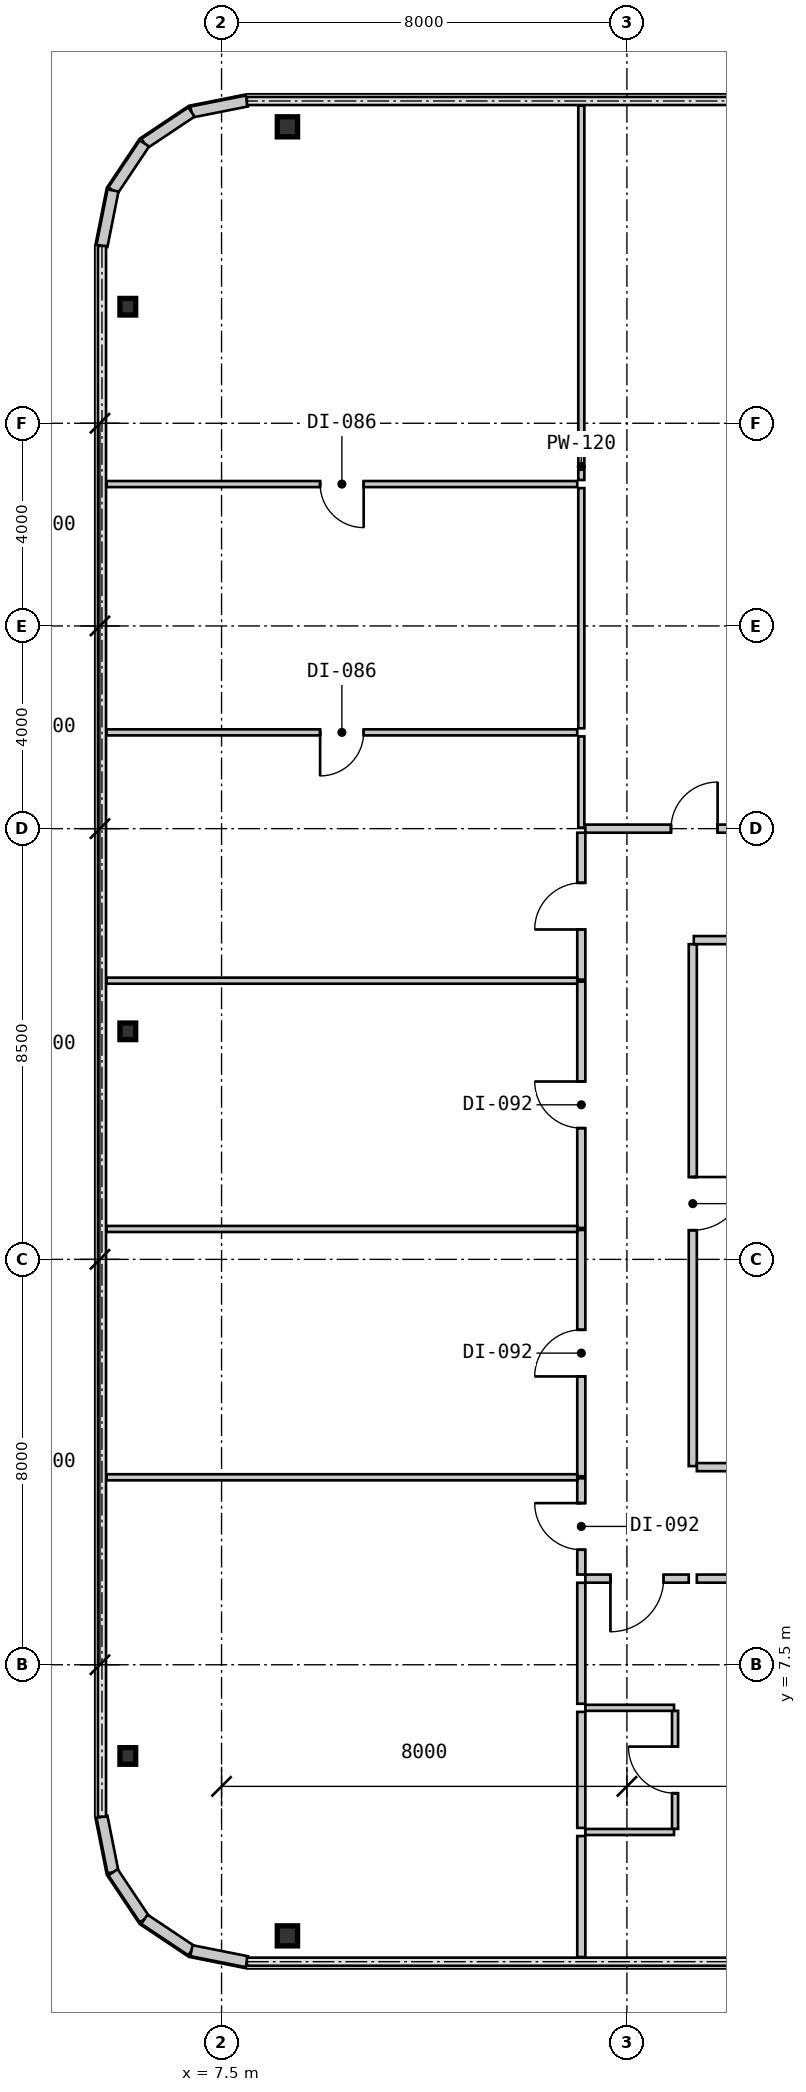
"""IFC4 building model, lengths in metres.
Left out: names, types, materials, properties, quantities, classifications, styles, units other than length and angle.
Written with IfcOpenShell. Run it as: python <this file> out.ifc"""

import sys

from ifc_helpers import new_model, si_unit, direction, frame, frame_2d, origin, origin_2d, place, context, subcontext, project, spatial, rectangle, i_section, extrude, source, transform, mapped, element, fill, save


model = new_model("IFC4")
c1 = context("Model", 3, precision=1e-05, world=origin(), true_north=direction((0.0, 1.0)))
c2 = subcontext(c1, "Body", "Model", "MODEL_VIEW")
j1 = project(units=[si_unit("LENGTHUNIT", "METRE"), si_unit("PLANEANGLEUNIT", "RADIAN")], contexts=[c1])
p1 = place(None, origin())
s1 = spatial("IfcSite", under=j1, at=p1, CompositionType="ELEMENT")
p2 = place(p1, origin())
s2 = spatial("IfcBuilding", under=s1, at=p2, CompositionType="ELEMENT")
p3 = place(p2, frame((0.0, 0.0, 32.55)))
s3 = spatial("IfcBuildingStorey", under=s2, at=p3, CompositionType="ELEMENT", Elevation=32.55)
m1 = source(origin(), c2, "Body", "SweptSolid", [
    extrude(i_section(OverallWidth=0.4, OverallDepth=0.396, WebThickness=0.022, FlangeThickness=0.034, at=origin_2d()), origin(), (0.0, 0.0, 1.0), 3.15),
])
for number, where, z_axis, x_axis in (
    (1, (8.8, 2.15, 0.0), (0.0, 0.0, 1.0), (1.0, 0.0, 0.0)),
    (2, (8.8, 37.85, 0.0), (0.0, 0.0, 1.0), (1.0, 0.0, 0.0)),
):
    element("IfcColumn", number, at=place(p3, frame(where, z_axis=z_axis, x_axis=x_axis)), inside=s3, PredefinedType="COLUMN", context=c2, shape_type="MappedRepresentation", body=[
        mapped(m1, transform((0.0, 0.0, 0.0), scale=1.0)),
    ])
m2 = source(origin(), c2, "Body", "SweptSolid", [
    extrude(i_section(OverallWidth=0.311, OverallDepth=0.327, WebThickness=0.016, FlangeThickness=0.025, at=origin_2d()), origin(), (0.0, 0.0, 1.0), 3.15),
])
for number, where, z_axis, x_axis in (
    (3, (5.65, 5.7, 0.0), (0.0, 0.0, 1.0), (1.0, 0.0, 0.0)),
    (4, (5.65, 20.0, 0.0), (0.0, 0.0, 1.0), (1.0, 0.0, 0.0)),
    (5, (5.65, 34.3, 0.0), (0.0, 0.0, 1.0), (1.0, 0.0, 0.0)),
):
    element("IfcColumn", number, at=place(p3, frame(where, z_axis=z_axis, x_axis=x_axis)), inside=s3, PredefinedType="COLUMN", context=c2, shape_type="MappedRepresentation", body=[
        mapped(m2, transform((0.0, 0.0, 0.0), scale=1.0)),
    ])
m3 = source(origin(), c2, "Body", "SweptSolid", [
    extrude(rectangle(XDim=1.116, YDim=0.22, at=frame_2d((0.558, 0.0))), origin(), (0.0, 0.0, 1.0), 2.93),
])
for number, where, z_axis, x_axis in (
    (6, (8.0, 38.36, 0.0), (0.0, 0.0, 1.0), (-0.981, -0.195, 0.0)),
    (7, (6.906, 38.142, 0.0), (0.0, 0.0, 1.0), (-0.831, -0.556, 0.0)),
    (8, (5.978, 37.522, 0.0), (0.0, 0.0, 1.0), (-0.556, -0.831, 0.0)),
    (9, (5.358, 36.594, 0.0), (0.0, 0.0, 1.0), (-0.195, -0.981, 0.0)),
    (10, (5.14, 4.5, 0.0), (0.0, 0.0, 1.0), (0.195, -0.981, 0.0)),
    (11, (5.358, 3.406, 0.0), (0.0, 0.0, 1.0), (0.556, -0.831, 0.0)),
    (12, (5.978, 2.478, 0.0), (0.0, 0.0, 1.0), (0.831, -0.556, 0.0)),
    (13, (6.906, 1.858, 0.0), (0.0, 0.0, 1.0), (0.981, -0.195, 0.0)),
):
    element("IfcWall", number, at=place(p3, frame(where, z_axis=z_axis, x_axis=x_axis)), inside=s3, PredefinedType="SOLIDWALL", context=c2, shape_type="MappedRepresentation", body=[
        mapped(m3, transform((0.0, 0.0, 0.0), scale=1.0)),
    ])
m4 = source(origin(), c2, "Body", "SweptSolid", [
    extrude(rectangle(XDim=10.3, YDim=0.16, at=frame_2d((5.15, 0.0))), origin(), (0.0, 0.0, 1.0), 2.93),
])
p4 = place(p3, frame((16.8, 21.72, 0.0), z_axis=(0.0, 0.0, 1.0), x_axis=(0.0, -1.0, 0.0)))
e14 = element("IfcWall", 14, at=p4, inside=s3, PredefinedType="PARTITIONING", context=c2, shape_type="MappedRepresentation", body=[
    mapped(m4, transform((0.0, 0.0, 0.0), scale=1.0)),
])
m5 = source(origin(), c2, "Body", "SweptSolid", [
    extrude(rectangle(XDim=1.05, YDim=2.1, at=frame_2d((0.525, 1.05))), frame((0.0, 0.09, 0.0), z_axis=(0.0, -1.0, 0.0), x_axis=(1.0, 0.0, 0.0)), (0.0, 0.0, 1.0), 0.18),
])
p5 = place(p4, frame((4.595, 0.0, 0.0)))
e15 = element("IfcOpeningElement", 15, at=p5, cuts=e14, PredefinedType="OPENING", context=c2, shape_type="MappedRepresentation", body=[
    mapped(m5, transform((0.0, 0.0, 0.0), scale=1.0)),
])
m6 = source(origin(), c2, "Body", "SweptSolid", [
    extrude(rectangle(XDim=7.159, YDim=0.16, at=frame_2d((3.58, 0.0))), origin(), (0.0, 0.0, 1.0), 2.93),
])
p6 = place(p3, frame((23.98, 21.8, 0.0), z_axis=(0.0, 0.0, 1.0), x_axis=(-1.0, 0.0, 0.0)))
e16 = element("IfcWall", 16, at=p6, inside=s3, PredefinedType="PARTITIONING", context=c2, shape_type="MappedRepresentation", body=[
    mapped(m6, transform((0.0, 0.0, 0.0), scale=1.0)),
])
m7 = source(origin(), c2, "Body", "SweptSolid", [
    extrude(rectangle(XDim=2.04, YDim=0.16, at=frame_2d((1.02, 0.0))), origin(), (0.0, 0.0, 1.0), 2.93),
])
p7 = place(p3, frame((16.72, 9.2, 0.0), z_axis=(0.0, 0.0, 1.0), x_axis=(-1.0, 0.0, 0.0)))
e17 = element("IfcWall", 17, at=p7, inside=s3, PredefinedType="PARTITIONING", context=c2, shape_type="MappedRepresentation", body=[
    mapped(m7, transform((0.0, 0.0, 0.0), scale=1.0)),
])
p8 = place(p7, frame((0.495, 0.0, 0.0)))
e18 = element("IfcOpeningElement", 18, at=p8, cuts=e17, PredefinedType="OPENING", context=c2, shape_type="MappedRepresentation", body=[
    mapped(m5, transform((0.0, 0.0, 0.0), scale=1.0)),
])
m8 = source(origin(), c2, "Body", "SweptSolid", [
    extrude(rectangle(XDim=1.9, YDim=0.16, at=frame_2d((0.95, 0.0))), origin(), (0.0, 0.0, 1.0), 2.93),
])
p9 = place(p3, frame((14.6, 9.28, 0.0), z_axis=(0.0, 0.0, 1.0), x_axis=(0.0, 1.0, 0.0)))
e19 = element("IfcWall", 19, at=p9, inside=s3, PredefinedType="PARTITIONING", context=c2, shape_type="MappedRepresentation", body=[
    mapped(m8, transform((0.0, 0.0, 0.0), scale=1.0)),
])
m9 = source(origin(), c2, "Body", "SweptSolid", [
    extrude(rectangle(XDim=0.92, YDim=2.1, at=frame_2d((0.46, 1.05))), frame((0.0, 0.09, 0.0), z_axis=(0.0, -1.0, 0.0), x_axis=(1.0, 0.0, 0.0)), (0.0, 0.0, 1.0), 0.18),
])
p10 = place(p9, frame((0.49, 0.0, 0.0)))
e20 = element("IfcOpeningElement", 20, at=p10, cuts=e19, PredefinedType="OPENING", context=c2, shape_type="MappedRepresentation", body=[
    mapped(m9, transform((0.0, 0.0, 0.0), scale=1.0)),
])
m10 = source(origin(), c2, "Body", "SweptSolid", [
    extrude(rectangle(XDim=4.86, YDim=0.16, at=frame_2d((2.43, 0.0))), origin(), (0.0, 0.0, 1.0), 2.93),
])
p11 = place(p3, frame((14.6, 11.22, 0.0), z_axis=(0.0, 0.0, 1.0), x_axis=(0.0, 1.0, 0.0)))
e21 = element("IfcWall", 21, at=p11, inside=s3, PredefinedType="PARTITIONING", context=c2, shape_type="MappedRepresentation", body=[
    mapped(m10, transform((0.0, 0.0, 0.0), scale=1.0)),
])
p12 = place(p11, frame((1.97, 0.0, 0.0)))
e22 = element("IfcOpeningElement", 22, at=p12, cuts=e21, PredefinedType="OPENING", context=c2, shape_type="MappedRepresentation", body=[
    mapped(m9, transform((0.0, 0.0, 0.0), scale=1.0)),
])
p13 = place(p3, frame((14.6, 16.12, 0.0), z_axis=(0.0, 0.0, 1.0), x_axis=(0.0, 1.0, 0.0)))
e23 = element("IfcWall", 23, at=p13, inside=s3, PredefinedType="PARTITIONING", context=c2, shape_type="MappedRepresentation", body=[
    mapped(m10, transform((0.0, 0.0, 0.0), scale=1.0)),
])
p14 = place(p13, frame((1.97, 0.0, 0.0)))
e24 = element("IfcOpeningElement", 24, at=p14, cuts=e23, PredefinedType="OPENING", context=c2, shape_type="MappedRepresentation", body=[
    mapped(m9, transform((0.0, 0.0, 0.0), scale=1.0)),
])
m11 = source(origin(), c2, "Body", "SweptSolid", [
    extrude(rectangle(XDim=2.9, YDim=0.16, at=frame_2d((1.45, 0.0))), origin(), (0.0, 0.0, 1.0), 2.93),
])
p15 = place(p3, frame((14.6, 21.02, 0.0), z_axis=(0.0, 0.0, 1.0), x_axis=(0.0, 1.0, 0.0)))
e25 = element("IfcWall", 25, at=p15, inside=s3, PredefinedType="PARTITIONING", context=c2, shape_type="MappedRepresentation", body=[
    mapped(m11, transform((0.0, 0.0, 0.0), scale=1.0)),
])
p16 = place(p15, frame((0.99, 0.0, 0.0)))
e26 = element("IfcOpeningElement", 26, at=p16, cuts=e25, PredefinedType="OPENING", context=c2, shape_type="MappedRepresentation", body=[
    mapped(m9, transform((0.0, 0.0, 0.0), scale=1.0)),
])
m12 = source(origin(), c2, "Body", "SweptSolid", [
    extrude(rectangle(XDim=4.13, YDim=0.16, at=frame_2d((2.065, 0.0))), origin(), (0.0, 0.0, 1.0), 2.93),
])
p17 = place(p3, frame((14.68, 24.0, 0.0), z_axis=(0.0, 0.0, 1.0), x_axis=(1.0, 0.0, 0.0)))
e27 = element("IfcWall", 27, at=p17, inside=s3, PredefinedType="PARTITIONING", context=c2, shape_type="MappedRepresentation", body=[
    mapped(m12, transform((0.0, 0.0, 0.0), scale=1.0)),
])
p18 = place(p17, frame((1.69, 0.0, 0.0)))
e28 = element("IfcOpeningElement", 28, at=p18, cuts=e27, PredefinedType="OPENING", context=c2, shape_type="MappedRepresentation", body=[
    mapped(m9, transform((0.0, 0.0, 0.0), scale=1.0)),
])
m13 = source(origin(), c2, "Body", "SweptSolid", [
    extrude(rectangle(XDim=7.1, YDim=0.16, at=frame_2d((3.55, 0.0))), origin(), (0.0, 0.0, 1.0), 2.93),
])
p19 = place(p3, frame((16.88, 11.4, 0.0), z_axis=(0.0, 0.0, 1.0), x_axis=(1.0, 0.0, 0.0)))
e29 = element("IfcWall", 29, at=p19, inside=s3, PredefinedType="PARTITIONING", context=c2, shape_type="MappedRepresentation", body=[
    mapped(m13, transform((0.0, 0.0, 0.0), scale=1.0)),
])
m14 = source(origin(), c2, "Body", "SweptSolid", [
    extrude(rectangle(XDim=1.1, YDim=0.16, at=frame_2d((0.55, 0.0))), origin(), (0.0, 0.0, 1.0), 2.93),
])
p20 = place(p3, frame((17.98, 9.2, 0.0), z_axis=(0.0, 0.0, 1.0), x_axis=(-1.0, 0.0, 0.0)))
e30 = element("IfcWall", 30, at=p20, inside=s3, PredefinedType="PARTITIONING", context=c2, shape_type="MappedRepresentation", body=[
    mapped(m14, transform((0.0, 0.0, 0.0), scale=1.0)),
])
m15 = source(origin(), c2, "Body", "SweptSolid", [
    extrude(rectangle(XDim=2.33, YDim=0.12, at=frame_2d((1.165, 0.0))), origin(), (0.0, 0.0, 1.0), 2.93),
])
p21 = place(p3, frame((16.45, 4.26, 0.0), z_axis=(0.0, 0.0, 1.0), x_axis=(0.0, 1.0, 0.0)))
e31 = element("IfcWall", 31, at=p21, inside=s3, PredefinedType="PARTITIONING", context=c2, shape_type="MappedRepresentation", body=[
    mapped(m15, transform((0.0, 0.0, 0.0), scale=1.0)),
])
m16 = source(origin(), c2, "Body", "SweptSolid", [
    extrude(rectangle(XDim=0.92, YDim=2.1, at=frame_2d((0.46, 1.05))), frame((0.0, 0.07, 0.0), z_axis=(0.0, -1.0, 0.0), x_axis=(1.0, 0.0, 0.0)), (0.0, 0.0, 1.0), 0.14),
])
p22 = place(p21, frame((0.705, 0.0, 0.0)))
e32 = element("IfcOpeningElement", 32, at=p22, cuts=e31, PredefinedType="OPENING", context=c2, shape_type="MappedRepresentation", body=[
    mapped(m16, transform((0.0, 0.0, 0.0), scale=1.0)),
])
m17 = source(origin(), c2, "Body", "SweptSolid", [
    extrude(rectangle(XDim=1.75, YDim=0.12, at=frame_2d((0.875, 0.0))), origin(), (0.0, 0.0, 1.0), 2.93),
])
for number, where, z_axis, x_axis in (
    (33, (14.68, 4.2, 0.0), (0.0, 0.0, 1.0), (1.0, 0.0, 0.0)),
    (34, (16.43, 6.65, 0.0), (0.0, 0.0, 1.0), (-1.0, 0.0, 0.0)),
):
    element("IfcWall", number, at=place(p3, frame(where, z_axis=z_axis, x_axis=x_axis)), inside=s3, PredefinedType="PARTITIONING", context=c2, shape_type="MappedRepresentation", body=[
        mapped(m17, transform((0.0, 0.0, 0.0), scale=1.0)),
    ])
m18 = source(origin(), c2, "Body", "SweptSolid", [
    extrude(rectangle(XDim=2.388, YDim=0.16, at=frame_2d((1.194, 0.0))), origin(), (0.0, 0.0, 1.0), 2.93),
])
p23 = place(p3, frame((14.6, 1.732, 0.0), z_axis=(0.0, 0.0, 1.0), x_axis=(0.0, 1.0, 0.0)))
e35 = element("IfcWall", 35, at=p23, inside=s3, PredefinedType="PARTITIONING", context=c2, shape_type="MappedRepresentation", body=[
    mapped(m18, transform((0.0, 0.0, 0.0), scale=1.0)),
])
m19 = source(origin(), c2, "Body", "SweptSolid", [
    extrude(rectangle(XDim=2.388, YDim=0.16, at=frame_2d((1.194, 0.0))), origin(), (0.0, 0.0, 1.0), 2.93),
])
p24 = place(p3, frame((14.6, 6.73, 0.0), z_axis=(0.0, 0.0, 1.0), x_axis=(0.0, 1.0, 0.0)))
e36 = element("IfcWall", 36, at=p24, inside=s3, PredefinedType="PARTITIONING", context=c2, shape_type="MappedRepresentation", body=[
    mapped(m19, transform((0.0, 0.0, 0.0), scale=1.0)),
])
m20 = source(origin(), c2, "Body", "SweptSolid", [
    extrude(rectangle(XDim=2.29, YDim=0.16, at=frame_2d((1.145, 0.0))), origin(), (0.0, 0.0, 1.0), 2.93),
])
p25 = place(p3, frame((14.6, 4.28, 0.0), z_axis=(0.0, 0.0, 1.0), x_axis=(0.0, 1.0, 0.0)))
e37 = element("IfcWall", 37, at=p25, inside=s3, PredefinedType="PARTITIONING", context=c2, shape_type="MappedRepresentation", body=[
    mapped(m20, transform((0.0, 0.0, 0.0), scale=1.0)),
])
m21 = source(origin(), c2, "Body", "SweptSolid", [
    extrude(rectangle(XDim=9.29, YDim=0.12, at=frame_2d((4.645, 0.0))), origin(), (0.0, 0.0, 1.0), 2.93),
])
for number, where, z_axis, x_axis in (
    (38, (5.23, 11.2, 0.0), (0.0, 0.0, 1.0), (1.0, 0.0, 0.0)),
    (39, (5.23, 16.1, 0.0), (0.0, 0.0, 1.0), (1.0, 0.0, 0.0)),
    (40, (5.23, 21.0, 0.0), (0.0, 0.0, 1.0), (1.0, 0.0, 0.0)),
):
    element("IfcWall", number, at=place(p3, frame(where, z_axis=z_axis, x_axis=x_axis)), inside=s3, PredefinedType="PARTITIONING", context=c2, shape_type="MappedRepresentation", body=[
        mapped(m21, transform((0.0, 0.0, 0.0), scale=1.0)),
    ])
p26 = place(p3, frame((5.23, 25.9, 0.0), z_axis=(0.0, 0.0, 1.0), x_axis=(1.0, 0.0, 0.0)))
e41 = element("IfcWall", 41, at=p26, inside=s3, PredefinedType="PARTITIONING", context=c2, shape_type="MappedRepresentation", body=[
    mapped(m21, transform((0.0, 0.0, 0.0), scale=1.0)),
])
m22 = source(origin(), c2, "Body", "SweptSolid", [
    extrude(rectangle(XDim=0.86, YDim=2.1, at=frame_2d((0.43, 1.05))), frame((0.0, 0.07, 0.0), z_axis=(0.0, -1.0, 0.0), x_axis=(1.0, 0.0, 0.0)), (0.0, 0.0, 1.0), 0.14),
])
p27 = place(p26, frame((4.215, 0.0, 0.0)))
e42 = element("IfcOpeningElement", 42, at=p27, cuts=e41, PredefinedType="OPENING", context=c2, shape_type="MappedRepresentation", body=[
    mapped(m22, transform((0.0, 0.0, 0.0), scale=1.0)),
])
m23 = source(origin(), c2, "Body", "SweptSolid", [
    extrude(rectangle(XDim=1.8, YDim=0.12, at=frame_2d((0.9, 0.0))), origin(), (0.0, 0.0, 1.0), 2.93),
])
p28 = place(p3, frame((14.6, 25.82, 0.0), z_axis=(0.0, 0.0, 1.0), x_axis=(0.0, -1.0, 0.0)))
e43 = element("IfcWall", 43, at=p28, inside=s3, PredefinedType="PARTITIONING", context=c2, shape_type="MappedRepresentation", body=[
    mapped(m23, transform((0.0, 0.0, 0.0), scale=1.0)),
])
p29 = place(p3, frame((5.23, 30.8, 0.0), z_axis=(0.0, 0.0, 1.0), x_axis=(1.0, 0.0, 0.0)))
e44 = element("IfcWall", 44, at=p29, inside=s3, PredefinedType="PARTITIONING", context=c2, shape_type="MappedRepresentation", body=[
    mapped(m21, transform((0.0, 0.0, 0.0), scale=1.0)),
])
p30 = place(p29, frame((4.215, 0.0, 0.0)))
e45 = element("IfcOpeningElement", 45, at=p30, cuts=e44, PredefinedType="OPENING", context=c2, shape_type="MappedRepresentation", body=[
    mapped(m22, transform((0.0, 0.0, 0.0), scale=1.0)),
])
m24 = source(origin(), c2, "Body", "SweptSolid", [
    extrude(rectangle(XDim=4.74, YDim=0.12, at=frame_2d((2.37, 0.0))), origin(), (0.0, 0.0, 1.0), 2.93),
])
p31 = place(p3, frame((14.6, 30.72, 0.0), z_axis=(0.0, 0.0, 1.0), x_axis=(0.0, -1.0, 0.0)))
e46 = element("IfcWall", 46, at=p31, inside=s3, PredefinedType="PARTITIONING", context=c2, shape_type="MappedRepresentation", body=[
    mapped(m24, transform((0.0, 0.0, 0.0), scale=1.0)),
])
m25 = source(origin(), c2, "Body", "SweptSolid", [
    extrude(rectangle(XDim=7.39, YDim=0.12, at=frame_2d((3.695, 0.0))), origin(), (0.0, 0.0, 1.0), 2.93),
])
p32 = place(p3, frame((14.6, 38.27, 0.0), z_axis=(0.0, 0.0, 1.0), x_axis=(0.0, -1.0, 0.0)))
e47 = element("IfcWall", 47, at=p32, inside=s3, PredefinedType="PARTITIONING", context=c2, shape_type="MappedRepresentation", body=[
    mapped(m25, transform((0.0, 0.0, 0.0), scale=1.0)),
])
m26 = source(origin(), c2, "Body", "SweptSolid", [
    extrude(rectangle(XDim=1.05, YDim=2.1, at=frame_2d((0.525, 1.05))), frame((0.0, 0.025, 0.0), z_axis=(0.0, -1.0, 0.0), x_axis=(1.0, 0.0, 0.0)), (0.0, 0.0, 1.0), 0.05),
])
p33 = place(p5, origin())
e48 = element("IfcDoor", 48, at=p33, inside=s3, OperationType="SINGLE_SWING_LEFT", PredefinedType="DOOR", context=c2, shape_type="MappedRepresentation", body=[
    mapped(m26, transform((0.0, 0.0, 0.0), scale=1.0)),
])
fill(e15, e48)
p34 = place(p8, origin())
e49 = element("IfcDoor", 49, at=p34, inside=s3, OperationType="SINGLE_SWING_RIGHT", PredefinedType="DOOR", context=c2, shape_type="MappedRepresentation", body=[
    mapped(m26, transform((0.0, 0.0, 0.0), scale=1.0)),
])
fill(e18, e49)
m27 = source(origin(), c2, "Body", "SweptSolid", [
    extrude(rectangle(XDim=0.92, YDim=2.1, at=frame_2d((0.46, 1.05))), frame((0.0, 0.025, 0.0), z_axis=(0.0, -1.0, 0.0), x_axis=(1.0, 0.0, 0.0)), (0.0, 0.0, 1.0), 0.05),
])
p35 = place(p10, origin())
e50 = element("IfcDoor", 50, at=p35, inside=s3, OperationType="SINGLE_SWING_RIGHT", PredefinedType="DOOR", context=c2, shape_type="MappedRepresentation", body=[
    mapped(m27, transform((0.0, 0.0, 0.0), scale=1.0)),
])
fill(e20, e50)
p36 = place(p12, origin())
e51 = element("IfcDoor", 51, at=p36, inside=s3, OperationType="SINGLE_SWING_LEFT", PredefinedType="DOOR", context=c2, shape_type="MappedRepresentation", body=[
    mapped(m27, transform((0.0, 0.0, 0.0), scale=1.0)),
])
fill(e22, e51)
p37 = place(p14, origin())
e52 = element("IfcDoor", 52, at=p37, inside=s3, OperationType="SINGLE_SWING_RIGHT", PredefinedType="DOOR", context=c2, shape_type="MappedRepresentation", body=[
    mapped(m27, transform((0.0, 0.0, 0.0), scale=1.0)),
])
fill(e24, e52)
p38 = place(p16, origin())
e53 = element("IfcDoor", 53, at=p38, inside=s3, OperationType="SINGLE_SWING_LEFT", PredefinedType="DOOR", context=c2, shape_type="MappedRepresentation", body=[
    mapped(m27, transform((0.0, 0.0, 0.0), scale=1.0)),
])
fill(e26, e53)
p39 = place(p18, origin())
e54 = element("IfcDoor", 54, at=p39, inside=s3, OperationType="SINGLE_SWING_RIGHT", PredefinedType="DOOR", context=c2, shape_type="MappedRepresentation", body=[
    mapped(m27, transform((0.0, 0.0, 0.0), scale=1.0)),
])
fill(e28, e54)
p40 = place(p22, origin())
e55 = element("IfcDoor", 55, at=p40, inside=s3, OperationType="SINGLE_SWING_RIGHT", PredefinedType="DOOR", context=c2, shape_type="MappedRepresentation", body=[
    mapped(m27, transform((0.0, 0.0, 0.0), scale=1.0)),
])
fill(e32, e55)
m28 = source(origin(), c2, "Body", "SweptSolid", [
    extrude(rectangle(XDim=0.86, YDim=2.1, at=frame_2d((0.43, 1.05))), frame((0.0, 0.025, 0.0), z_axis=(0.0, -1.0, 0.0), x_axis=(1.0, 0.0, 0.0)), (0.0, 0.0, 1.0), 0.05),
])
p41 = place(p27, frame((0.86, 0.0, 0.0), z_axis=(0.0, 0.0, 1.0), x_axis=(-1.0, 0.0, 0.0)))
e56 = element("IfcDoor", 56, at=p41, inside=s3, OperationType="SINGLE_SWING_RIGHT", PredefinedType="DOOR", context=c2, shape_type="MappedRepresentation", body=[
    mapped(m28, transform((0.0, 0.0, 0.0), scale=1.0)),
])
fill(e42, e56)
p42 = place(p30, frame((0.86, 0.0, 0.0), z_axis=(0.0, 0.0, 1.0), x_axis=(-1.0, 0.0, 0.0)))
e57 = element("IfcDoor", 57, at=p42, inside=s3, OperationType="SINGLE_SWING_LEFT", PredefinedType="DOOR", context=c2, shape_type="MappedRepresentation", body=[
    mapped(m28, transform((0.0, 0.0, 0.0), scale=1.0)),
])
fill(e45, e57)
save(model, sys.argv[1])
